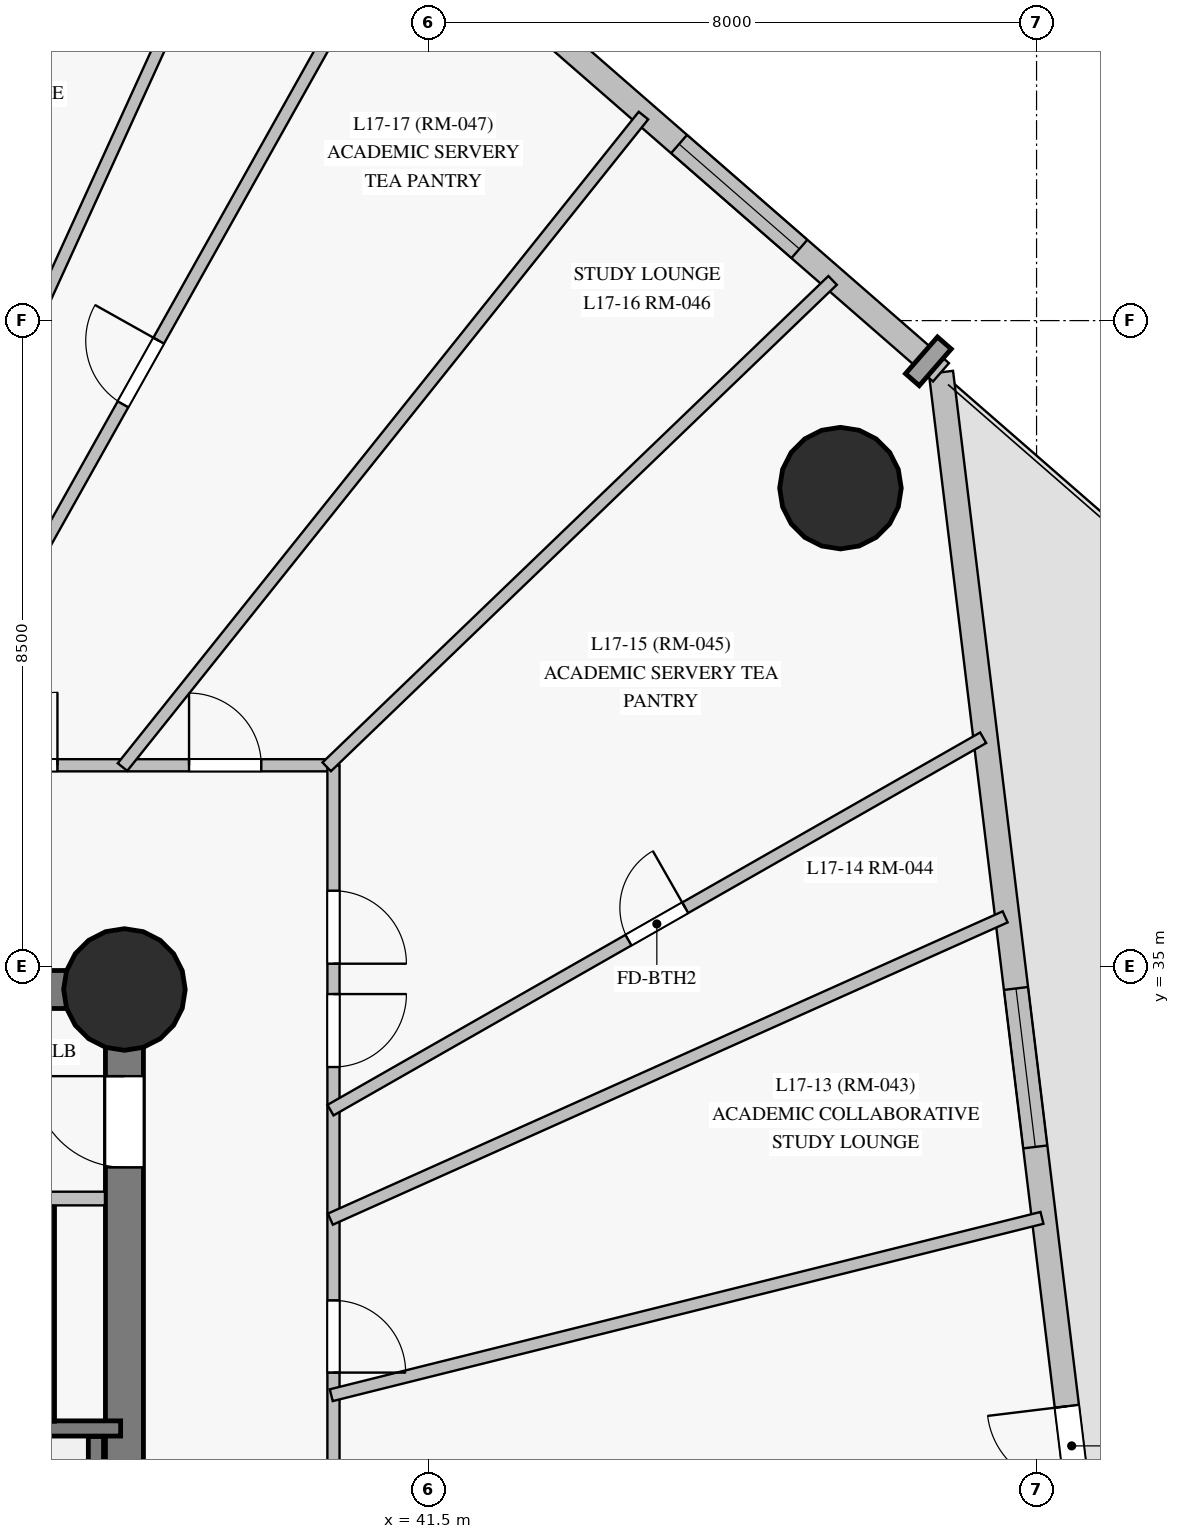
"""IFC4 building model, lengths in metres.
Left out: names, types, materials, properties, quantities, classifications, styles, units other than length and angle.
Written with IfcOpenShell. Run it as: python <this file> out.ifc"""

import sys

from ifc_helpers import new_model, si_unit, direction, frame, frame_2d, origin, origin_with_axes, origin_2d, place, context, subcontext, project, spatial, rectangle, circle, extrude, source, transform, mapped, element, fill, save


model = new_model("IFC4")
c1 = context("Model", 3, precision=1e-05, world=origin(), true_north=direction((0.0, 1.0)))
c2 = subcontext(c1, "Body", "Model", "MODEL_VIEW")
j1 = project(units=[si_unit("LENGTHUNIT", "METRE"), si_unit("PLANEANGLEUNIT", "RADIAN")], contexts=[c1])
p1 = place(None, origin())
s1 = spatial("IfcSite", under=j1, at=p1, CompositionType="ELEMENT")
p2 = place(p1, origin())
s2 = spatial("IfcBuilding", under=s1, at=p2, CompositionType="ELEMENT")
p3 = place(p2, frame((0.0, 0.0, 66.1)))
s3 = spatial("IfcBuildingStorey", under=s2, at=p3, CompositionType="ELEMENT", Elevation=66.1)
p4 = place(p3, frame((37.5, 18.3, 0.0), z_axis=(0.0, 0.0, 1.0), x_axis=(0.0, 1.0, 0.0)))
e1 = element("IfcWall", 1, at=p4, inside=s3, PredefinedType="SHEAR", context=c2, shape_type="SweptSolid", body=[
    extrude(rectangle(XDim=16.4, YDim=0.5, at=frame_2d((8.2, 0.0))), origin(), (0.0, 0.0, 1.0), 3.35),
])
p5 = place(p4, frame((14.06, 0.0, 0.0)))
e2 = element("IfcOpeningElement", 2, at=p5, cuts=e1, PredefinedType="OPENING", context=c2, shape_type="SweptSolid", body=[
    extrude(rectangle(XDim=1.2, YDim=2.15, at=frame_2d((0.6, 1.075))), frame((0.0, 0.26, 0.0), z_axis=(0.0, -1.0, 0.0), x_axis=(1.0, 0.0, 0.0)), (0.0, 0.0, 1.0), 0.52),
])
p6 = place(p3, frame((37.5, 34.7, 0.0), z_axis=(0.0, 0.0, 1.0), x_axis=(-1.0, 0.0, 0.0)))
e3 = element("IfcWall", 3, at=p6, inside=s3, PredefinedType="SHEAR", context=c2, shape_type="SweptSolid", body=[
    extrude(rectangle(XDim=10.95, YDim=0.5, at=frame_2d((5.475, 0.0))), origin(), (0.0, 0.0, 1.0), 3.35),
])
p7 = place(p6, frame((2.15, 0.0, 0.0)))
e4 = element("IfcOpeningElement", 4, at=p7, cuts=e3, PredefinedType="OPENING", context=c2, shape_type="SweptSolid", body=[
    extrude(rectangle(XDim=1.2, YDim=2.15, at=frame_2d((0.6, 1.075))), frame((0.0, 0.26, 0.0), z_axis=(0.0, -1.0, 0.0), x_axis=(1.0, 0.0, 0.0)), (0.0, 0.0, 1.0), 0.52),
])
p8 = place(p6, frame((6.35, 0.0, 0.0)))
e5 = element("IfcOpeningElement", 5, at=p8, cuts=e3, PredefinedType="OPENING", context=c2, shape_type="SweptSolid", body=[
    extrude(rectangle(XDim=1.1, YDim=2.15, at=frame_2d((0.55, 1.075))), frame((0.0, 0.26, 0.0), z_axis=(0.0, -1.0, 0.0), x_axis=(1.0, 0.0, 0.0)), (0.0, 0.0, 1.0), 0.52),
])
m1 = source(origin_with_axes(), c2, "Body", "SweptSolid", [
    extrude(circle(Radius=0.8, at=origin_2d()), origin(), (0.0, 0.0, 1.0), 3.6),
])
for number, where, z_axis, x_axis in (
    (6, (37.5, 34.7, 0.0), (0.0, 0.0, 1.0), (1.0, 0.0, 0.0)),
    (7, (46.92, 41.296, 0.0), (0.0, 0.0, 1.0), (1.0, 0.0, 0.0)),
):
    element("IfcColumn", number, at=place(p3, frame(where, z_axis=z_axis, x_axis=x_axis)), inside=s3, PredefinedType="COLUMN", context=c2, shape_type="MappedRepresentation", body=[
        mapped(m1, transform((0.0, 0.0, 0.0), scale=1.0)),
    ])
p9 = place(p3, frame((50.415, 24.979, 0.0), z_axis=(0.0, 0.0, 1.0), x_axis=(-0.120844129627, 0.992671494672, 0.0)))
e8 = element("IfcWall", 8, at=p9, inside=s3, PredefinedType="SOLIDWALL", context=c2, shape_type="SweptSolid", body=[
    extrude(rectangle(XDim=17.972, YDim=0.32, at=frame_2d((8.986, 0.0))), origin(), (0.0, 0.0, 1.0), 3.02),
])
p10 = place(p9, frame((7.707, 0.0, 0.85)))
e9 = element("IfcOpeningElement", 9, at=p10, cuts=e8, PredefinedType="OPENING", context=c2, shape_type="SweptSolid", body=[
    extrude(rectangle(XDim=2.1, YDim=1.95, at=frame_2d((1.05, 0.975))), frame((0.0, 0.17, 0.0), z_axis=(0.0, -1.0, 0.0), x_axis=(1.0, 0.0, 0.0)), (0.0, 0.0, 1.0), 0.34),
])
p11 = place(p9, frame((3.219, 0.0, 0.0)))
e10 = element("IfcOpeningElement", 10, at=p11, cuts=e8, PredefinedType="OPENING", context=c2, shape_type="SweptSolid", body=[
    extrude(rectangle(XDim=1.05, YDim=2.12, at=frame_2d((0.525, 1.06))), frame((0.0, 0.17, 0.0), z_axis=(0.0, -1.0, 0.0), x_axis=(1.0, 0.0, 0.0)), (0.0, 0.0, 1.0), 0.34),
])
p12 = place(p3, frame((48.243, 42.82, 0.0), z_axis=(0.0, 0.0, 1.0), x_axis=(-0.753916755465, 0.656969958087, 0.0)))
e11 = element("IfcWall", 11, at=p12, inside=s3, PredefinedType="SOLIDWALL", context=c2, shape_type="SweptSolid", body=[
    extrude(rectangle(XDim=7.384, YDim=0.32, at=frame_2d((3.692, 0.0))), origin(), (0.0, 0.0, 1.0), 3.02),
])
p13 = place(p12, frame((2.47, 0.0, 0.85)))
e12 = element("IfcOpeningElement", 12, at=p13, cuts=e11, PredefinedType="OPENING", context=c2, shape_type="SweptSolid", body=[
    extrude(rectangle(XDim=2.1, YDim=1.95, at=frame_2d((1.05, 0.975))), frame((0.0, 0.17, 0.0), z_axis=(0.0, -1.0, 0.0), x_axis=(1.0, 0.0, 0.0)), (0.0, 0.0, 1.0), 0.34),
])
p14 = place(p3, frame((37.125, 21.32, 0.0), z_axis=(0.0, 0.0, 1.0), x_axis=(0.0, 1.0, 0.0)))
e13 = element("IfcWall", 13, at=p14, inside=s3, PredefinedType="SHEAR", context=c2, shape_type="SweptSolid", body=[
    extrude(rectangle(XDim=7.5, YDim=0.2, at=frame_2d((3.75, 0.0))), origin(), (0.0, 0.0, 1.0), 3.35),
])
p15 = place(p3, frame((33.455, 28.925, 0.0), z_axis=(0.0, 0.0, 1.0), x_axis=(1.0, 0.0, 0.0)))
e14 = element("IfcWall", 14, at=p15, inside=s3, PredefinedType="SHEAR", context=c2, shape_type="SweptSolid", body=[
    extrude(rectangle(XDim=3.995, YDim=0.2, at=frame_2d((1.998, 0.0))), origin(), (0.0, 0.0, 1.0), 3.35),
])
p16 = place(p3, frame((36.48, 29.02, 0.0), z_axis=(0.0, 0.0, 1.0), x_axis=(0.0, 1.0, 0.0)))
e15 = element("IfcWall", 15, at=p16, inside=s3, PredefinedType="SHEAR", context=c2, shape_type="SweptSolid", body=[
    extrude(rectangle(XDim=2.86, YDim=0.2, at=frame_2d((1.43, 0.0))), origin(), (0.0, 0.0, 1.0), 3.35),
])
p17 = place(p3, frame((10.5, 37.65, 0.0), z_axis=(0.0, 0.0, 1.0), x_axis=(1.0, 0.0, 0.0)))
e16 = element("IfcWall", 16, at=p17, inside=s3, PredefinedType="PARTITIONING", context=c2, shape_type="SweptSolid", body=[
    extrude(rectangle(XDim=29.75, YDim=0.16, at=frame_2d((14.875, 0.0))), origin(), (0.0, 0.0, 1.0), 2.75),
])
p18 = place(p17, frame((27.85, 0.0, 0.0)))
e17 = element("IfcOpeningElement", 17, at=p18, cuts=e16, PredefinedType="OPENING", context=c2, shape_type="SweptSolid", body=[
    extrude(rectangle(XDim=0.95, YDim=2.15, at=frame_2d((0.475, 1.075))), frame((0.0, 0.09, 0.0), z_axis=(0.0, -1.0, 0.0), x_axis=(1.0, 0.0, 0.0)), (0.0, 0.0, 1.0), 0.18),
])
p19 = place(p17, frame((25.159, 0.0, 0.0)))
e18 = element("IfcOpeningElement", 18, at=p19, cuts=e16, PredefinedType="OPENING", context=c2, shape_type="SweptSolid", body=[
    extrude(rectangle(XDim=0.96, YDim=2.15, at=frame_2d((0.48, 1.075))), frame((0.0, 0.09, 0.0), z_axis=(0.0, -1.0, 0.0), x_axis=(1.0, 0.0, 0.0)), (0.0, 0.0, 1.0), 0.18),
])
p20 = place(p17, frame((21.837, 0.0, 0.0)))
e19 = element("IfcOpeningElement", 19, at=p20, cuts=e16, PredefinedType="OPENING", context=c2, shape_type="SweptSolid", body=[
    extrude(rectangle(XDim=0.95, YDim=2.15, at=frame_2d((0.475, 1.075))), frame((0.0, 0.09, 0.0), z_axis=(0.0, -1.0, 0.0), x_axis=(1.0, 0.0, 0.0)), (0.0, 0.0, 1.0), 0.18),
])
p21 = place(p17, frame((18.863, 0.0, 0.0)))
e20 = element("IfcOpeningElement", 20, at=p21, cuts=e16, PredefinedType="OPENING", context=c2, shape_type="SweptSolid", body=[
    extrude(rectangle(XDim=0.95, YDim=2.15, at=frame_2d((0.475, 1.075))), frame((0.0, 0.09, 0.0), z_axis=(0.0, -1.0, 0.0), x_axis=(1.0, 0.0, 0.0)), (0.0, 0.0, 1.0), 0.18),
])
p22 = place(p17, frame((15.14, 0.0, 0.0)))
e21 = element("IfcOpeningElement", 21, at=p22, cuts=e16, PredefinedType="OPENING", context=c2, shape_type="SweptSolid", body=[
    extrude(rectangle(XDim=0.96, YDim=2.15, at=frame_2d((0.48, 1.075))), frame((0.0, 0.09, 0.0), z_axis=(0.0, -1.0, 0.0), x_axis=(1.0, 0.0, 0.0)), (0.0, 0.0, 1.0), 0.18),
])
p23 = place(p17, frame((13.176, 0.0, 0.0)))
e22 = element("IfcOpeningElement", 22, at=p23, cuts=e16, PredefinedType="OPENING", context=c2, shape_type="SweptSolid", body=[
    extrude(rectangle(XDim=0.95, YDim=2.15, at=frame_2d((0.475, 1.075))), frame((0.0, 0.09, 0.0), z_axis=(0.0, -1.0, 0.0), x_axis=(1.0, 0.0, 0.0)), (0.0, 0.0, 1.0), 0.18),
])
p24 = place(p17, frame((9.938, 0.0, 0.0)))
e23 = element("IfcOpeningElement", 23, at=p24, cuts=e16, PredefinedType="OPENING", context=c2, shape_type="SweptSolid", body=[
    extrude(rectangle(XDim=0.95, YDim=2.15, at=frame_2d((0.475, 1.075))), frame((0.0, 0.09, 0.0), z_axis=(0.0, -1.0, 0.0), x_axis=(1.0, 0.0, 0.0)), (0.0, 0.0, 1.0), 0.18),
])
p25 = place(p3, frame((40.25, 37.65, 0.0), z_axis=(0.0, 0.0, 1.0), x_axis=(0.0, -1.0, 0.0)))
e24 = element("IfcWall", 24, at=p25, inside=s3, PredefinedType="PARTITIONING", context=c2, shape_type="SweptSolid", body=[
    extrude(rectangle(XDim=22.3, YDim=0.16, at=frame_2d((11.15, 0.0))), origin(), (0.0, 0.0, 1.0), 2.75),
])
p26 = place(p25, frame((14.02, 0.0, 0.0)))
e25 = element("IfcOpeningElement", 25, at=p26, cuts=e24, PredefinedType="OPENING", context=c2, shape_type="SweptSolid", body=[
    extrude(rectangle(XDim=0.95, YDim=2.15, at=frame_2d((0.475, 1.075))), frame((0.0, 0.09, 0.0), z_axis=(0.0, -1.0, 0.0), x_axis=(1.0, 0.0, 0.0)), (0.0, 0.0, 1.0), 0.18),
])
p27 = place(p25, frame((10.675, 0.0, 0.0)))
e26 = element("IfcOpeningElement", 26, at=p27, cuts=e24, PredefinedType="OPENING", context=c2, shape_type="SweptSolid", body=[
    extrude(rectangle(XDim=0.96, YDim=2.15, at=frame_2d((0.48, 1.075))), frame((0.0, 0.09, 0.0), z_axis=(0.0, -1.0, 0.0), x_axis=(1.0, 0.0, 0.0)), (0.0, 0.0, 1.0), 0.18),
])
p28 = place(p25, frame((7.04, 0.0, 0.0)))
e27 = element("IfcOpeningElement", 27, at=p28, cuts=e24, PredefinedType="OPENING", context=c2, shape_type="SweptSolid", body=[
    extrude(rectangle(XDim=0.95, YDim=2.15, at=frame_2d((0.475, 1.075))), frame((0.0, 0.09, 0.0), z_axis=(0.0, -1.0, 0.0), x_axis=(1.0, 0.0, 0.0)), (0.0, 0.0, 1.0), 0.18),
])
p29 = place(p25, frame((3.01, 0.0, 0.0)))
e28 = element("IfcOpeningElement", 28, at=p29, cuts=e24, PredefinedType="OPENING", context=c2, shape_type="SweptSolid", body=[
    extrude(rectangle(XDim=0.96, YDim=2.15, at=frame_2d((0.48, 1.075))), frame((0.0, 0.09, 0.0), z_axis=(0.0, -1.0, 0.0), x_axis=(1.0, 0.0, 0.0)), (0.0, 0.0, 1.0), 0.18),
])
p30 = place(p25, frame((1.651, 0.0, 0.0)))
e29 = element("IfcOpeningElement", 29, at=p30, cuts=e24, PredefinedType="OPENING", context=c2, shape_type="SweptSolid", body=[
    extrude(rectangle(XDim=0.96, YDim=2.15, at=frame_2d((0.48, 1.075))), frame((0.0, 0.09, 0.0), z_axis=(0.0, -1.0, 0.0), x_axis=(1.0, 0.0, 0.0)), (0.0, 0.0, 1.0), 0.18),
])
p31 = place(p3, frame((34.797, 37.611, 0.0), z_axis=(0.0, 0.0, 1.0), x_axis=(0.488977567901, 0.872296359094, 0.0)))
e30 = element("IfcWall", 30, at=p31, inside=s3, PredefinedType="PARTITIONING", context=c2, shape_type="SweptSolid", body=[
    extrude(rectangle(XDim=11.979, YDim=0.16, at=frame_2d((5.989, 0.0))), origin(), (0.0, 0.0, 1.0), 3.35),
])
p32 = place(p31, frame((5.489, 0.0, 0.0)))
e31 = element("IfcOpeningElement", 31, at=p32, cuts=e30, PredefinedType="OPENING", context=c2, shape_type="SweptSolid", body=[
    extrude(rectangle(XDim=0.96, YDim=2.15, at=frame_2d((0.48, 1.075))), frame((0.0, 0.09, 0.0), z_axis=(0.0, -1.0, 0.0), x_axis=(1.0, 0.0, 0.0)), (0.0, 0.0, 1.0), 0.18),
])
p33 = place(p3, frame((33.64, 37.623, 0.0), z_axis=(0.0, 0.0, 1.0), x_axis=(0.41503042051, 0.90980753462, 0.0)))
e32 = element("IfcWall", 32, at=p33, inside=s3, PredefinedType="PARTITIONING", context=c2, shape_type="SweptSolid", body=[
    extrude(rectangle(XDim=11.94, YDim=0.16, at=frame_2d((5.97, 0.0))), origin(), (0.0, 0.0, 1.0), 3.35),
])
p34 = place(p3, frame((37.475, 37.627, 0.0), z_axis=(0.0, 0.0, 1.0), x_axis=(0.62453496585, 0.780996847901, 0.0)))
e33 = element("IfcWall", 33, at=p34, inside=s3, PredefinedType="PARTITIONING", context=c2, shape_type="SweptSolid", body=[
    extrude(rectangle(XDim=10.974, YDim=0.16, at=frame_2d((5.487, 0.0))), origin(), (0.0, 0.0, 1.0), 3.35),
])
p35 = place(p3, frame((40.211, 33.113, 0.0), z_axis=(0.0, 0.0, 1.0), x_axis=(0.868569695906, 0.49556703215, 0.0)))
e34 = element("IfcWall", 34, at=p35, inside=s3, PredefinedType="PARTITIONING", context=c2, shape_type="SweptSolid", body=[
    extrude(rectangle(XDim=9.886, YDim=0.16, at=frame_2d((4.943, 0.0))), origin(), (0.0, 0.0, 1.0), 3.35),
])
p36 = place(p35, frame((4.513, 0.0, 0.0)))
e35 = element("IfcOpeningElement", 35, at=p36, cuts=e34, PredefinedType="OPENING", context=c2, shape_type="SweptSolid", body=[
    extrude(rectangle(XDim=0.86, YDim=2.04, at=frame_2d((0.43, 1.02))), frame((0.0, 0.09, 0.0), z_axis=(0.0, -1.0, 0.0), x_axis=(1.0, 0.0, 0.0)), (0.0, 0.0, 1.0), 0.18),
])
p37 = place(p3, frame((40.209, 31.679, 0.0), z_axis=(0.0, 0.0, 1.0), x_axis=(0.912627841784, 0.408791416741, 0.0)))
e36 = element("IfcWall", 36, at=p37, inside=s3, PredefinedType="PARTITIONING", context=c2, shape_type="SweptSolid", body=[
    extrude(rectangle(XDim=9.728, YDim=0.16, at=frame_2d((4.864, 0.0))), origin(), (0.0, 0.0, 1.0), 3.35),
])
p38 = place(p3, frame((40.221, 29.363, 0.0), z_axis=(0.0, 0.0, 1.0), x_axis=(0.97025416332, 0.242088534549, 0.0)))
e37 = element("IfcWall", 37, at=p38, inside=s3, PredefinedType="PARTITIONING", context=c2, shape_type="SweptSolid", body=[
    extrude(rectangle(XDim=9.637, YDim=0.16, at=frame_2d((4.818, 0.0))), origin(), (0.0, 0.0, 1.0), 3.35),
])
p39 = place(p3, frame((40.161, 37.629, 0.0), z_axis=(0.0, 0.0, 1.0), x_axis=(0.720839161992, 0.693102375222, 0.0)))
e38 = element("IfcWall", 38, at=p39, inside=s3, PredefinedType="PARTITIONING", context=c2, shape_type="SweptSolid", body=[
    extrude(rectangle(XDim=9.233, YDim=0.16, at=frame_2d((4.617, 0.0))), origin(), (0.0, 0.0, 1.0), 3.35),
])
p40 = place(p3, frame((33.535, 31.95, 0.0), z_axis=(0.0, 0.0, 1.0), x_axis=(1.0, 0.0, 0.0)))
e39 = element("IfcWall", 39, at=p40, inside=s3, PredefinedType="PARTITIONING", context=c2, shape_type="SweptSolid", body=[
    extrude(rectangle(XDim=3.709, YDim=0.18, at=frame_2d((1.854, 0.0))), origin(), (0.0, 0.0, 1.0), 3.35),
])
p41 = place(p40, frame((0.9, 0.0, 0.0)))
e40 = element("IfcOpeningElement", 40, at=p41, cuts=e39, PredefinedType="OPENING", context=c2, shape_type="SweptSolid", body=[
    extrude(rectangle(XDim=1.3, YDim=2.2, at=frame_2d((0.65, 1.1))), frame((0.0, 0.1, 0.0), z_axis=(0.0, -1.0, 0.0), x_axis=(1.0, 0.0, 0.0)), (0.0, 0.0, 1.0), 0.2),
])
m2 = source(origin_with_axes(), c2, "Body", "SweptSolid", [
    extrude(rectangle(XDim=2.1, YDim=1.95, at=frame_2d((1.05, 0.975))), frame((0.0, 0.03, 0.0), z_axis=(0.0, -1.0, 0.0), x_axis=(1.0, 0.0, 0.0)), (0.0, 0.0, 1.0), 0.06),
])
p42 = place(p10, origin())
e41 = element("IfcWindow", 41, at=p42, inside=s3, PartitioningType="SINGLE_PANEL", PredefinedType="WINDOW", context=c2, shape_type="MappedRepresentation", body=[
    mapped(m2, transform((0.0, 0.0, 0.0), scale=1.0)),
])
fill(e9, e41)
p43 = place(p13, origin())
e42 = element("IfcWindow", 42, at=p43, inside=s3, PartitioningType="SINGLE_PANEL", PredefinedType="WINDOW", context=c2, shape_type="MappedRepresentation", body=[
    mapped(m2, transform((0.0, 0.0, 0.0), scale=1.0)),
])
fill(e12, e42)
m3 = source(origin_with_axes(), c2, "Body", "SweptSolid", [
    extrude(rectangle(XDim=1.05, YDim=2.12, at=frame_2d((0.525, 1.06))), frame((0.0, 0.025, 0.0), z_axis=(0.0, -1.0, 0.0), x_axis=(1.0, 0.0, 0.0)), (0.0, 0.0, 1.0), 0.05),
])
p44 = place(p11, origin())
e43 = element("IfcDoor", 43, at=p44, inside=s3, OperationType="SINGLE_SWING_RIGHT", PredefinedType="DOOR", context=c2, shape_type="MappedRepresentation", body=[
    mapped(m3, transform((0.0, 0.0, 0.0), scale=1.0)),
])
fill(e10, e43)
m4 = source(origin_with_axes(), c2, "Body", "SweptSolid", [
    extrude(rectangle(XDim=1.2, YDim=2.15, at=frame_2d((0.6, 1.075))), frame((0.0, 0.025, 0.0), z_axis=(0.0, -1.0, 0.0), x_axis=(1.0, 0.0, 0.0)), (0.0, 0.0, 1.0), 0.05),
])
p45 = place(p5, origin())
e44 = element("IfcDoor", 44, at=p45, inside=s3, OperationType="SINGLE_SWING_RIGHT", PredefinedType="DOOR", context=c2, shape_type="MappedRepresentation", body=[
    mapped(m4, transform((0.0, 0.0, 0.0), scale=1.0)),
])
fill(e2, e44)
m5 = source(origin_with_axes(), c2, "Body", "SweptSolid", [
    extrude(rectangle(XDim=0.95, YDim=2.15, at=frame_2d((0.475, 1.075))), frame((0.0, 0.025, 0.0), z_axis=(0.0, -1.0, 0.0), x_axis=(1.0, 0.0, 0.0)), (0.0, 0.0, 1.0), 0.05),
])
p46 = place(p28, origin())
e45 = element("IfcDoor", 45, at=p46, inside=s3, OperationType="SINGLE_SWING_RIGHT", PredefinedType="DOOR", context=c2, shape_type="MappedRepresentation", body=[
    mapped(m5, transform((0.0, 0.0, 0.0), scale=1.0)),
])
fill(e27, e45)
m6 = source(origin_with_axes(), c2, "Body", "SweptSolid", [
    extrude(rectangle(XDim=0.96, YDim=2.15, at=frame_2d((0.48, 1.075))), frame((0.0, 0.025, 0.0), z_axis=(0.0, -1.0, 0.0), x_axis=(1.0, 0.0, 0.0)), (0.0, 0.0, 1.0), 0.05),
])
p47 = place(p29, origin())
e46 = element("IfcDoor", 46, at=p47, inside=s3, OperationType="SINGLE_SWING_LEFT", PredefinedType="DOOR", context=c2, shape_type="MappedRepresentation", body=[
    mapped(m6, transform((0.0, 0.0, 0.0), scale=1.0)),
])
fill(e28, e46)
p48 = place(p30, origin())
e47 = element("IfcDoor", 47, at=p48, inside=s3, OperationType="SINGLE_SWING_RIGHT", PredefinedType="DOOR", context=c2, shape_type="MappedRepresentation", body=[
    mapped(m6, transform((0.0, 0.0, 0.0), scale=1.0)),
])
fill(e29, e47)
p49 = place(p18, origin())
e48 = element("IfcDoor", 48, at=p49, inside=s3, OperationType="SINGLE_SWING_LEFT", PredefinedType="DOOR", context=c2, shape_type="MappedRepresentation", body=[
    mapped(m5, transform((0.0, 0.0, 0.0), scale=1.0)),
])
fill(e17, e48)
p50 = place(p19, origin())
e49 = element("IfcDoor", 49, at=p50, inside=s3, OperationType="SINGLE_SWING_RIGHT", PredefinedType="DOOR", context=c2, shape_type="MappedRepresentation", body=[
    mapped(m6, transform((0.0, 0.0, 0.0), scale=1.0)),
])
fill(e18, e49)
p51 = place(p32, origin())
e50 = element("IfcDoor", 50, at=p51, inside=s3, OperationType="SINGLE_SWING_RIGHT", PredefinedType="DOOR", context=c2, shape_type="MappedRepresentation", body=[
    mapped(m6, transform((0.0, 0.0, 0.0), scale=1.0)),
])
fill(e31, e50)
m7 = source(origin_with_axes(), c2, "Body", "SweptSolid", [
    extrude(rectangle(XDim=0.86, YDim=2.04, at=frame_2d((0.43, 1.02))), frame((0.0, 0.025, 0.0), z_axis=(0.0, -1.0, 0.0), x_axis=(1.0, 0.0, 0.0)), (0.0, 0.0, 1.0), 0.05),
])
p52 = place(p36, origin())
e51 = element("IfcDoor", 51, at=p52, inside=s3, OperationType="SINGLE_SWING_RIGHT", PredefinedType="DOOR", context=c2, shape_type="MappedRepresentation", body=[
    mapped(m7, transform((0.0, 0.0, 0.0), scale=1.0)),
])
fill(e35, e51)
save(model, sys.argv[1])
